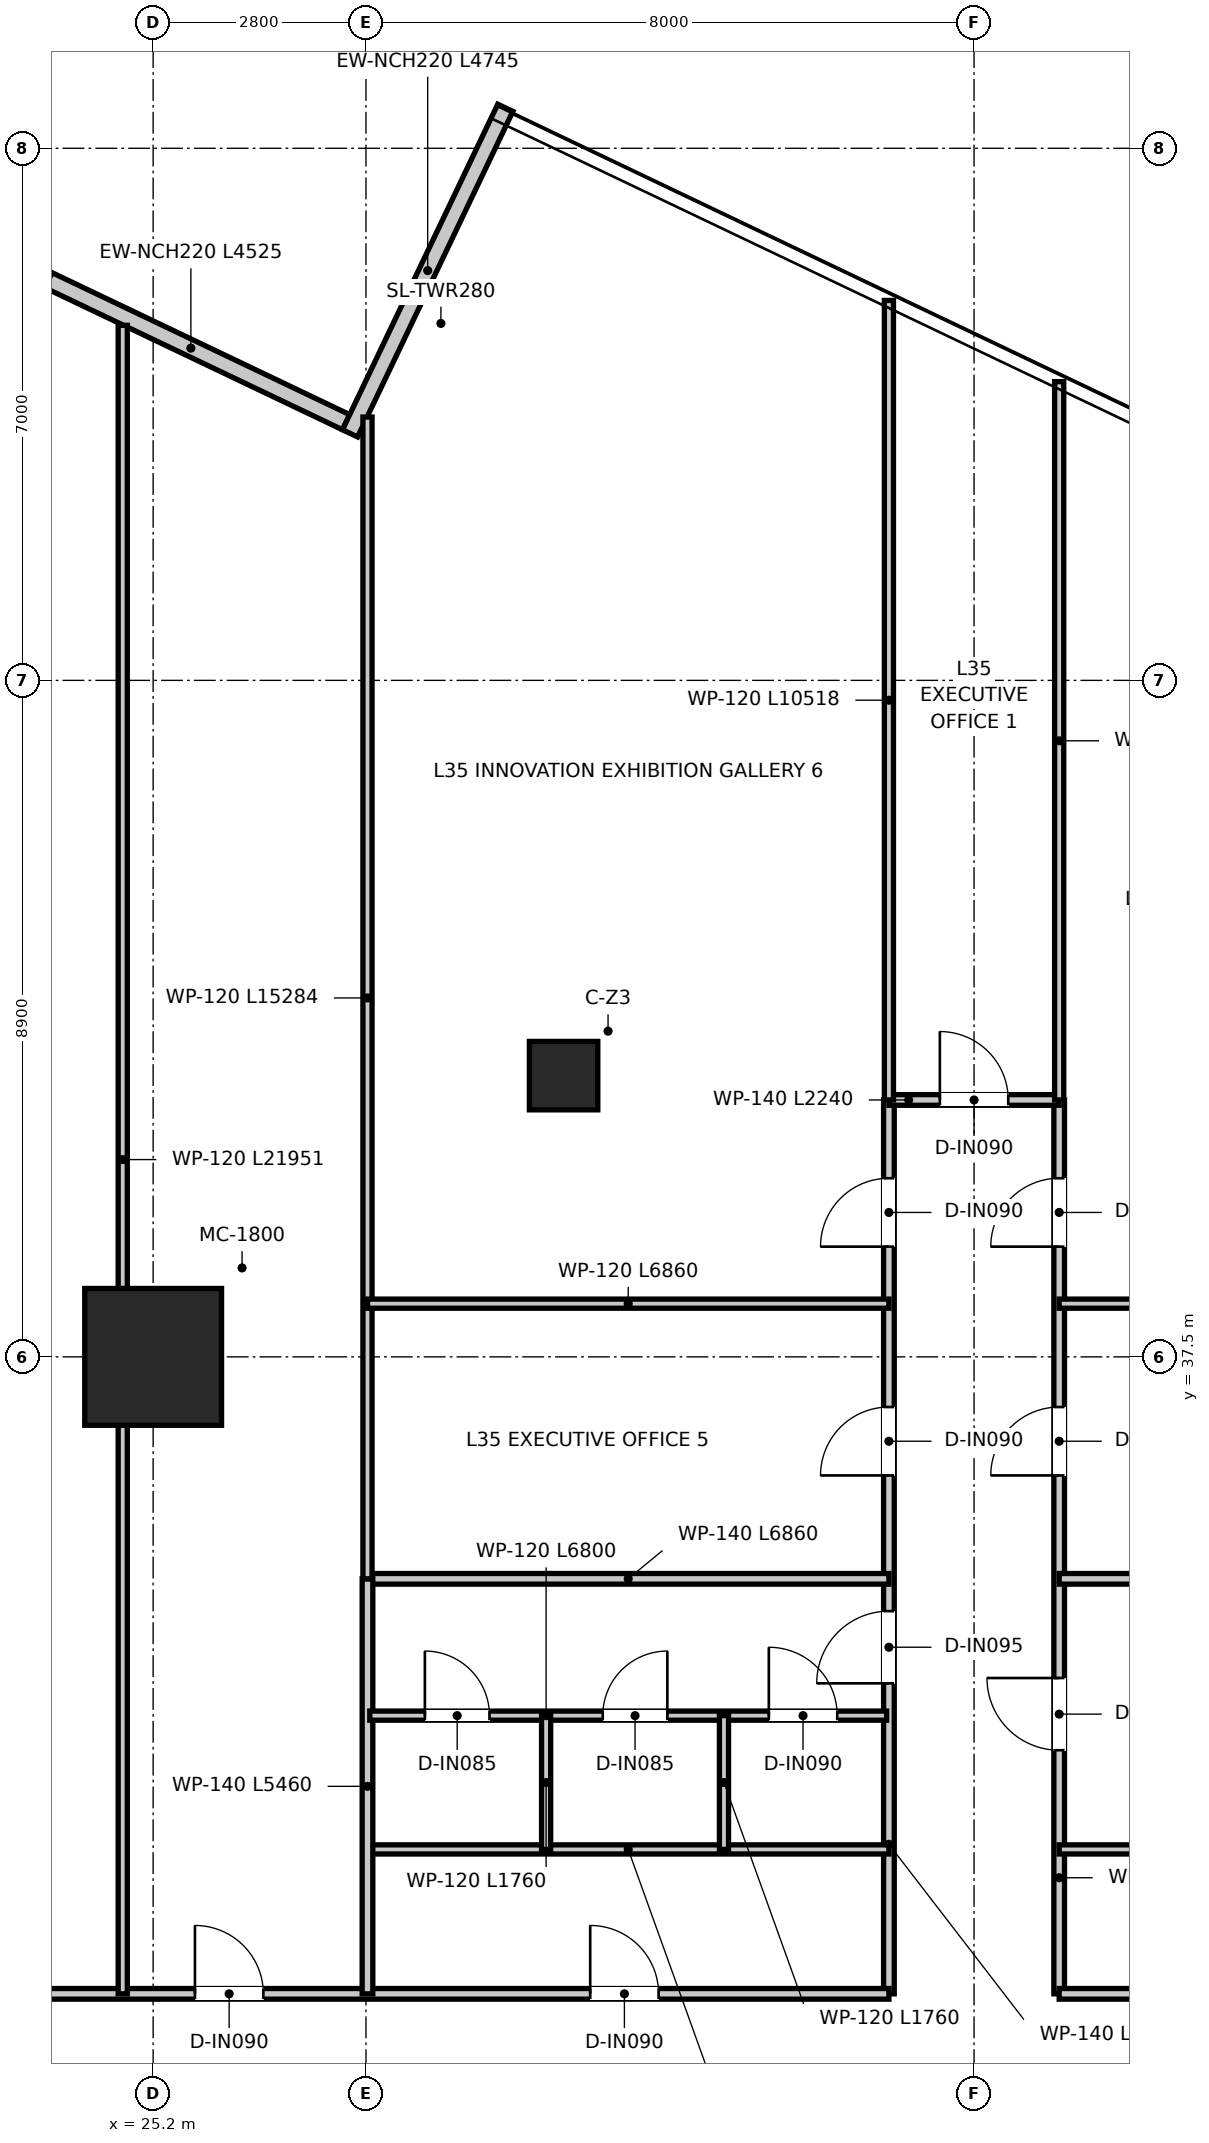
"""IFC4 building model, lengths in metres.
Left out: names, types, materials, properties, quantities, classifications, styles, units other than length and angle.
Written with IfcOpenShell. Run it as: python <this file> out.ifc"""

import sys

from ifc_helpers import new_model, si_unit, direction, frame, frame_2d, origin, origin_2d, place, context, subcontext, project, spatial, rectangle, extrude, source, transform, mapped, element, fill, save


model = new_model("IFC4")
c1 = context("Model", 3, precision=1e-05, world=origin(), true_north=direction((0.0, 1.0)))
c2 = subcontext(c1, "Body", "Model", "MODEL_VIEW")
j1 = project(units=[si_unit("LENGTHUNIT", "METRE"), si_unit("PLANEANGLEUNIT", "RADIAN")], contexts=[c1])
p1 = place(None, origin())
s1 = spatial("IfcSite", under=j1, at=p1, CompositionType="ELEMENT")
p2 = place(p1, origin())
s2 = spatial("IfcBuilding", under=s1, at=p2, CompositionType="ELEMENT")
p3 = place(p2, frame((0.0, 0.0, 146.2)))
s3 = spatial("IfcBuildingStorey", under=s2, at=p3, CompositionType="ELEMENT", Elevation=146.2)
m1 = source(origin(), c2, "Body", "SweptSolid", [
    extrude(rectangle(XDim=1.8, YDim=1.8, at=origin_2d()), origin(), (0.0, 0.0, 1.0), 3.95),
])
p4 = place(p3, frame((25.2, 37.5, 0.0), z_axis=(0.0, 0.0, 1.0), x_axis=(1.0, 0.0, 0.0)))
e1 = element("IfcColumn", 1, at=p4, inside=s3, PredefinedType="USERDEFINED", context=c2, shape_type="MappedRepresentation", body=[
    mapped(m1, transform((0.0, 0.0, 0.0), x_axis=(1.0, 0.0, 0.0), y_axis=(0.0, 1.0, 0.0), z_axis=(0.0, 0.0, 1.0), scale=1.0)),
])
m2 = source(origin(), c2, "Body", "SweptSolid", [
    extrude(rectangle(XDim=0.9, YDim=0.9, at=origin_2d()), origin(), (0.0, 0.0, 1.0), 3.95),
])
p5 = place(p3, frame((30.6, 41.2, 0.0), z_axis=(0.0, 0.0, 1.0), x_axis=(1.0, 0.0, 0.0)))
e2 = element("IfcColumn", 2, at=p5, inside=s3, PredefinedType="COLUMN", context=c2, shape_type="MappedRepresentation", body=[
    mapped(m2, transform((0.0, 0.0, 0.0), x_axis=(1.0, 0.0, 0.0), y_axis=(0.0, 1.0, 0.0), z_axis=(0.0, 0.0, 1.0), scale=1.0)),
])
p6 = place(p3, frame((27.739, 49.797, 0.0), z_axis=(0.0, 0.0, 1.0), x_axis=(-0.902592070314, 0.43049686945, 0.0)))
e3 = element("IfcWall", 3, at=p6, inside=s3, PredefinedType="ELEMENTEDWALL", context=c2, shape_type="SweptSolid", body=[
    extrude(rectangle(XDim=4.525, YDim=0.22, at=frame_2d((2.262, 0.0))), origin(), (0.0, 0.0, 1.0), 3.67),
])
p7 = place(p3, frame((29.833, 53.933, 0.0), z_axis=(0.0, 0.0, 1.0), x_axis=(-0.430506704164, -0.902587379521, 0.0)))
e4 = element("IfcWall", 4, at=p7, inside=s3, PredefinedType="ELEMENTEDWALL", context=c2, shape_type="SweptSolid", body=[
    extrude(rectangle(XDim=4.745, YDim=0.22, at=frame_2d((2.373, 0.0))), origin(), (0.0, 0.0, 1.0), 3.67),
])
p8 = place(p3, frame((34.88, 29.12, 0.0), z_axis=(0.0, 0.0, 1.0), x_axis=(0.0, 1.0, 0.0)))
e5 = element("IfcWall", 5, at=p8, inside=s3, PredefinedType="PARTITIONING", context=c2, shape_type="SweptSolid", body=[
    extrude(rectangle(XDim=11.76, YDim=0.14, at=frame_2d((5.88, 0.0))), origin(), (0.0, 0.0, 1.0), 3.03),
])
p9 = place(p8, frame((4.085, 0.0, 0.0)))
e6 = element("IfcOpeningElement", 6, at=p9, cuts=e5, PredefinedType="OPENING", context=c2, shape_type="SweptSolid", body=[
    extrude(rectangle(XDim=0.95, YDim=2.1, at=frame_2d((0.475, 1.05))), frame((0.0, 0.08, 0.0), z_axis=(0.0, -1.0, 0.0), x_axis=(1.0, 0.0, 0.0)), (0.0, 0.0, 1.0), 0.16),
])
p10 = place(p8, frame((6.82, 0.0, 0.0)))
e7 = element("IfcOpeningElement", 7, at=p10, cuts=e5, PredefinedType="OPENING", context=c2, shape_type="SweptSolid", body=[
    extrude(rectangle(XDim=0.9, YDim=2.1, at=frame_2d((0.45, 1.05))), frame((0.0, 0.08, 0.0), z_axis=(0.0, -1.0, 0.0), x_axis=(1.0, 0.0, 0.0)), (0.0, 0.0, 1.0), 0.16),
])
p11 = place(p8, frame((9.83, 0.0, 0.0)))
e8 = element("IfcOpeningElement", 8, at=p11, cuts=e5, PredefinedType="OPENING", context=c2, shape_type="SweptSolid", body=[
    extrude(rectangle(XDim=0.9, YDim=2.1, at=frame_2d((0.45, 1.05))), frame((0.0, 0.08, 0.0), z_axis=(0.0, -1.0, 0.0), x_axis=(1.0, 0.0, 0.0)), (0.0, 0.0, 1.0), 0.16),
])
p12 = place(p3, frame((37.12, 29.12, 0.0), z_axis=(0.0, 0.0, 1.0), x_axis=(0.0, 1.0, 0.0)))
e9 = element("IfcWall", 9, at=p12, inside=s3, PredefinedType="PARTITIONING", context=c2, shape_type="SweptSolid", body=[
    extrude(rectangle(XDim=11.76, YDim=0.14, at=frame_2d((5.88, 0.0))), origin(), (0.0, 0.0, 1.0), 3.03),
])
p13 = place(p12, frame((3.205, 0.0, 0.0)))
e10 = element("IfcOpeningElement", 10, at=p13, cuts=e9, PredefinedType="OPENING", context=c2, shape_type="SweptSolid", body=[
    extrude(rectangle(XDim=0.95, YDim=2.1, at=frame_2d((0.475, 1.05))), frame((0.0, 0.08, 0.0), z_axis=(0.0, -1.0, 0.0), x_axis=(1.0, 0.0, 0.0)), (0.0, 0.0, 1.0), 0.16),
])
p14 = place(p12, frame((6.82, 0.0, 0.0)))
e11 = element("IfcOpeningElement", 11, at=p14, cuts=e9, PredefinedType="OPENING", context=c2, shape_type="SweptSolid", body=[
    extrude(rectangle(XDim=0.9, YDim=2.1, at=frame_2d((0.45, 1.05))), frame((0.0, 0.08, 0.0), z_axis=(0.0, -1.0, 0.0), x_axis=(1.0, 0.0, 0.0)), (0.0, 0.0, 1.0), 0.16),
])
p15 = place(p12, frame((9.83, 0.0, 0.0)))
e12 = element("IfcOpeningElement", 12, at=p15, cuts=e9, PredefinedType="OPENING", context=c2, shape_type="SweptSolid", body=[
    extrude(rectangle(XDim=0.9, YDim=2.1, at=frame_2d((0.45, 1.05))), frame((0.0, 0.08, 0.0), z_axis=(0.0, -1.0, 0.0), x_axis=(1.0, 0.0, 0.0)), (0.0, 0.0, 1.0), 0.16),
])
p16 = place(p3, frame((34.88, 40.88, 0.0), z_axis=(0.0, 0.0, 1.0), x_axis=(1.0, 0.0, 0.0)))
e13 = element("IfcWall", 13, at=p16, inside=s3, PredefinedType="PARTITIONING", context=c2, shape_type="SweptSolid", body=[
    extrude(rectangle(XDim=2.24, YDim=0.14, at=frame_2d((1.12, 0.0))), origin(), (0.0, 0.0, 1.0), 3.67),
])
p17 = place(p16, frame((0.67, 0.0, 0.0)))
e14 = element("IfcOpeningElement", 14, at=p17, cuts=e13, PredefinedType="OPENING", context=c2, shape_type="SweptSolid", body=[
    extrude(rectangle(XDim=0.9, YDim=2.1, at=frame_2d((0.45, 1.05))), frame((0.0, 0.08, 0.0), z_axis=(0.0, -1.0, 0.0), x_axis=(1.0, 0.0, 0.0)), (0.0, 0.0, 1.0), 0.16),
])
p18 = place(p3, frame((12.99, 29.12, 0.0), z_axis=(0.0, 0.0, 1.0), x_axis=(1.0, 0.0, 0.0)))
e15 = element("IfcWall", 15, at=p18, inside=s3, PredefinedType="PARTITIONING", context=c2, shape_type="SweptSolid", body=[
    extrude(rectangle(XDim=21.889, YDim=0.14, at=frame_2d((10.945, 0.0))), origin(), (0.0, 0.0, 1.0), 3.03),
])
p19 = place(p18, frame((17.96, 0.0, 0.0)))
e16 = element("IfcOpeningElement", 16, at=p19, cuts=e15, PredefinedType="OPENING", context=c2, shape_type="SweptSolid", body=[
    extrude(rectangle(XDim=0.9, YDim=2.1, at=frame_2d((0.45, 1.05))), frame((0.0, 0.08, 0.0), z_axis=(0.0, -1.0, 0.0), x_axis=(1.0, 0.0, 0.0)), (0.0, 0.0, 1.0), 0.16),
])
p20 = place(p18, frame((1.978, 0.0, 0.0)))
e17 = element("IfcOpeningElement", 17, at=p20, cuts=e15, PredefinedType="OPENING", context=c2, shape_type="SweptSolid", body=[
    extrude(rectangle(XDim=0.9, YDim=2.1, at=frame_2d((0.45, 1.05))), frame((0.0, 0.08, 0.0), z_axis=(0.0, -1.0, 0.0), x_axis=(1.0, 0.0, 0.0)), (0.0, 0.0, 1.0), 0.16),
])
p21 = place(p18, frame((9.46, 0.0, 0.0)))
e18 = element("IfcOpeningElement", 18, at=p21, cuts=e15, PredefinedType="OPENING", context=c2, shape_type="SweptSolid", body=[
    extrude(rectangle(XDim=0.9, YDim=2.1, at=frame_2d((0.45, 1.05))), frame((0.0, 0.08, 0.0), z_axis=(0.0, -1.0, 0.0), x_axis=(1.0, 0.0, 0.0)), (0.0, 0.0, 1.0), 0.16),
])
p22 = place(p18, frame((12.76, 0.0, 0.0)))
e19 = element("IfcOpeningElement", 19, at=p22, cuts=e15, PredefinedType="OPENING", context=c2, shape_type="SweptSolid", body=[
    extrude(rectangle(XDim=0.9, YDim=2.1, at=frame_2d((0.45, 1.05))), frame((0.0, 0.08, 0.0), z_axis=(0.0, -1.0, 0.0), x_axis=(1.0, 0.0, 0.0)), (0.0, 0.0, 1.0), 0.16),
])
p23 = place(p3, frame((37.12, 29.12, 0.0), z_axis=(0.0, 0.0, 1.0), x_axis=(1.0, 0.0, 0.0)))
e20 = element("IfcWall", 20, at=p23, inside=s3, PredefinedType="PARTITIONING", context=c2, shape_type="SweptSolid", body=[
    extrude(rectangle(XDim=24.198, YDim=0.14, at=frame_2d((12.099, 0.0))), origin(), (0.0, 0.0, 1.0), 3.03),
])
p24 = place(p23, frame((3.03, 0.0, 0.0)))
e21 = element("IfcOpeningElement", 21, at=p24, cuts=e20, PredefinedType="OPENING", context=c2, shape_type="SweptSolid", body=[
    extrude(rectangle(XDim=0.9, YDim=2.1, at=frame_2d((0.45, 1.05))), frame((0.0, 0.08, 0.0), z_axis=(0.0, -1.0, 0.0), x_axis=(1.0, 0.0, 0.0)), (0.0, 0.0, 1.0), 0.16),
])
p25 = place(p23, frame((8.67, 0.0, 0.0)))
e22 = element("IfcOpeningElement", 22, at=p25, cuts=e20, PredefinedType="OPENING", context=c2, shape_type="SweptSolid", body=[
    extrude(rectangle(XDim=0.9, YDim=2.1, at=frame_2d((0.45, 1.05))), frame((0.0, 0.08, 0.0), z_axis=(0.0, -1.0, 0.0), x_axis=(1.0, 0.0, 0.0)), (0.0, 0.0, 1.0), 0.16),
])
p26 = place(p23, frame((17.762, 0.0, 0.0)))
e23 = element("IfcOpeningElement", 23, at=p26, cuts=e20, PredefinedType="OPENING", context=c2, shape_type="SweptSolid", body=[
    extrude(rectangle(XDim=0.9, YDim=2.1, at=frame_2d((0.45, 1.05))), frame((0.0, 0.08, 0.0), z_axis=(0.0, -1.0, 0.0), x_axis=(1.0, 0.0, 0.0)), (0.0, 0.0, 1.0), 0.16),
])
for number, where, z_axis, x_axis in (
    (24, (28.02, 31.02, 0.0), (0.0, 0.0, 1.0), (1.0, 0.0, 0.0)),
    (25, (37.12, 31.02, 0.0), (0.0, 0.0, 1.0), (1.0, 0.0, 0.0)),
):
    element("IfcWall", number, at=place(p3, frame(where, z_axis=z_axis, x_axis=x_axis)), inside=s3, PredefinedType="PARTITIONING", context=c2, shape_type="SweptSolid", body=[
        extrude(rectangle(XDim=6.86, YDim=0.12, at=frame_2d((3.43, 0.0))), origin(), (0.0, 0.0, 1.0), 3.08),
    ])
for number, where, z_axis, x_axis in (
    (26, (28.02, 34.58, 0.0), (0.0, 0.0, 1.0), (1.0, 0.0, 0.0)),
    (27, (37.12, 34.58, 0.0), (0.0, 0.0, 1.0), (1.0, 0.0, 0.0)),
):
    element("IfcWall", number, at=place(p3, frame(where, z_axis=z_axis, x_axis=x_axis)), inside=s3, PredefinedType="PARTITIONING", context=c2, shape_type="SweptSolid", body=[
        extrude(rectangle(XDim=6.86, YDim=0.14, at=frame_2d((3.43, 0.0))), origin(), (0.0, 0.0, 1.0), 3.08),
    ])
p27 = place(p3, frame((28.02, 29.12, 0.0), z_axis=(0.0, 0.0, 1.0), x_axis=(0.0, 1.0, 0.0)))
e28 = element("IfcWall", 28, at=p27, inside=s3, PredefinedType="PARTITIONING", context=c2, shape_type="SweptSolid", body=[
    extrude(rectangle(XDim=5.46, YDim=0.14, at=frame_2d((2.73, 0.0))), origin(), (0.0, 0.0, 1.0), 3.31),
])
p28 = place(p3, frame((28.05, 32.78, 0.0), z_axis=(0.0, 0.0, 1.0), x_axis=(1.0, 0.0, 0.0)))
e29 = element("IfcWall", 29, at=p28, inside=s3, PredefinedType="PARTITIONING", context=c2, shape_type="SweptSolid", body=[
    extrude(rectangle(XDim=6.8, YDim=0.12, at=frame_2d((3.4, 0.0))), origin(), (0.0, 0.0, 1.0), 3.08),
])
p29 = place(p28, frame((0.725, 0.0, 0.0)))
e30 = element("IfcOpeningElement", 30, at=p29, cuts=e29, PredefinedType="OPENING", context=c2, shape_type="SweptSolid", body=[
    extrude(rectangle(XDim=0.85, YDim=2.1, at=frame_2d((0.425, 1.05))), frame((0.0, 0.07, 0.0), z_axis=(0.0, -1.0, 0.0), x_axis=(1.0, 0.0, 0.0)), (0.0, 0.0, 1.0), 0.14),
])
p30 = place(p28, frame((3.065, 0.0, 0.0)))
e31 = element("IfcOpeningElement", 31, at=p30, cuts=e29, PredefinedType="OPENING", context=c2, shape_type="SweptSolid", body=[
    extrude(rectangle(XDim=0.85, YDim=2.1, at=frame_2d((0.425, 1.05))), frame((0.0, 0.07, 0.0), z_axis=(0.0, -1.0, 0.0), x_axis=(1.0, 0.0, 0.0)), (0.0, 0.0, 1.0), 0.14),
])
p31 = place(p28, frame((5.25, 0.0, 0.0)))
e32 = element("IfcOpeningElement", 32, at=p31, cuts=e29, PredefinedType="OPENING", context=c2, shape_type="SweptSolid", body=[
    extrude(rectangle(XDim=0.9, YDim=2.1, at=frame_2d((0.45, 1.05))), frame((0.0, 0.07, 0.0), z_axis=(0.0, -1.0, 0.0), x_axis=(1.0, 0.0, 0.0)), (0.0, 0.0, 1.0), 0.14),
])
p32 = place(p3, frame((30.37, 31.02, 0.0), z_axis=(0.0, 0.0, 1.0), x_axis=(0.0, 1.0, 0.0)))
e33 = element("IfcWall", 33, at=p32, inside=s3, PredefinedType="PARTITIONING", context=c2, shape_type="SweptSolid", body=[
    extrude(rectangle(XDim=1.76, YDim=0.12, at=frame_2d((0.88, 0.0))), origin(), (0.0, 0.0, 1.0), 3.08),
])
p33 = place(p3, frame((32.71, 31.02, 0.0), z_axis=(0.0, 0.0, 1.0), x_axis=(0.0, 1.0, 0.0)))
e34 = element("IfcWall", 34, at=p33, inside=s3, PredefinedType="PARTITIONING", context=c2, shape_type="SweptSolid", body=[
    extrude(rectangle(XDim=1.76, YDim=0.12, at=frame_2d((0.88, 0.0))), origin(), (0.0, 0.0, 1.0), 3.67),
])
p34 = place(p3, frame((34.88, 40.88, 0.0), z_axis=(0.0, 0.0, 1.0), x_axis=(0.0, 1.0, 0.0)))
e35 = element("IfcWall", 35, at=p34, inside=s3, PredefinedType="PARTITIONING", context=c2, shape_type="SweptSolid", body=[
    extrude(rectangle(XDim=10.518, YDim=0.12, at=frame_2d((5.259, 0.0))), origin(), (0.0, 0.0, 1.0), 3.28),
])
p35 = place(p3, frame((37.12, 40.88, 0.0), z_axis=(0.0, 0.0, 1.0), x_axis=(0.0, 1.0, 0.0)))
e36 = element("IfcWall", 36, at=p35, inside=s3, PredefinedType="PARTITIONING", context=c2, shape_type="SweptSolid", body=[
    extrude(rectangle(XDim=9.45, YDim=0.12, at=frame_2d((4.725, 0.0))), origin(), (0.0, 0.0, 1.0), 3.28),
])
p36 = place(p3, frame((24.8, 29.12, 0.0), z_axis=(0.0, 0.0, 1.0), x_axis=(0.0, 1.0, 0.0)))
e37 = element("IfcWall", 37, at=p36, inside=s3, PredefinedType="PARTITIONING", context=c2, shape_type="SweptSolid", body=[
    extrude(rectangle(XDim=21.951, YDim=0.12, at=frame_2d((10.975, 0.0))), origin(), (0.0, 0.0, 1.0), 3.08),
])
p37 = place(p3, frame((28.02, 34.58, 0.0), z_axis=(0.0, 0.0, 1.0), x_axis=(0.0, 1.0, 0.0)))
e38 = element("IfcWall", 38, at=p37, inside=s3, PredefinedType="PARTITIONING", context=c2, shape_type="SweptSolid", body=[
    extrude(rectangle(XDim=15.284, YDim=0.12, at=frame_2d((7.642, 0.0))), origin(), (0.0, 0.0, 1.0), 3.03),
])
for number, where, z_axis, x_axis in (
    (39, (28.02, 38.2, 0.0), (0.0, 0.0, 1.0), (1.0, 0.0, 0.0)),
    (40, (37.12, 38.2, 0.0), (0.0, 0.0, 1.0), (1.0, 0.0, 0.0)),
):
    element("IfcWall", number, at=place(p3, frame(where, z_axis=z_axis, x_axis=x_axis)), inside=s3, PredefinedType="PARTITIONING", context=c2, shape_type="SweptSolid", body=[
        extrude(rectangle(XDim=6.86, YDim=0.12, at=frame_2d((3.43, 0.0))), origin(), (0.0, 0.0, 1.0), 3.08),
    ])
p38 = place(p19, origin())
e41 = element("IfcDoor", 41, at=p38, inside=s3, OperationType="SINGLE_SWING_LEFT", PredefinedType="DOOR", context=c2, shape_type="SweptSolid", body=[
    extrude(rectangle(XDim=0.9, YDim=2.1, at=frame_2d((0.45, 1.05))), frame((0.0, 0.025, 0.0), z_axis=(0.0, -1.0, 0.0), x_axis=(1.0, 0.0, 0.0)), (0.0, 0.0, 1.0), 0.05),
])
fill(e16, e41)
p39 = place(p9, origin())
e42 = element("IfcDoor", 42, at=p39, inside=s3, OperationType="SINGLE_SWING_LEFT", PredefinedType="DOOR", context=c2, shape_type="SweptSolid", body=[
    extrude(rectangle(XDim=0.95, YDim=2.1, at=frame_2d((0.475, 1.05))), frame((0.0, 0.025, 0.0), z_axis=(0.0, -1.0, 0.0), x_axis=(1.0, 0.0, 0.0)), (0.0, 0.0, 1.0), 0.05),
])
fill(e6, e42)
p40 = place(p13, origin())
e43 = element("IfcDoor", 43, at=p40, inside=s3, OperationType="SINGLE_SWING_RIGHT", PredefinedType="DOOR", context=c2, shape_type="SweptSolid", body=[
    extrude(rectangle(XDim=0.95, YDim=2.1, at=frame_2d((0.475, 1.05))), frame((0.0, 0.025, 0.0), z_axis=(0.0, -1.0, 0.0), x_axis=(1.0, 0.0, 0.0)), (0.0, 0.0, 1.0), 0.05),
])
fill(e10, e43)
p41 = place(p29, origin())
e44 = element("IfcDoor", 44, at=p41, inside=s3, OperationType="SINGLE_SWING_LEFT", PredefinedType="DOOR", context=c2, shape_type="SweptSolid", body=[
    extrude(rectangle(XDim=0.85, YDim=2.1, at=frame_2d((0.425, 1.05))), frame((0.0, 0.025, 0.0), z_axis=(0.0, -1.0, 0.0), x_axis=(1.0, 0.0, 0.0)), (0.0, 0.0, 1.0), 0.05),
])
fill(e30, e44)
p42 = place(p30, origin())
e45 = element("IfcDoor", 45, at=p42, inside=s3, OperationType="SINGLE_SWING_RIGHT", PredefinedType="DOOR", context=c2, shape_type="SweptSolid", body=[
    extrude(rectangle(XDim=0.85, YDim=2.1, at=frame_2d((0.425, 1.05))), frame((0.0, 0.025, 0.0), z_axis=(0.0, -1.0, 0.0), x_axis=(1.0, 0.0, 0.0)), (0.0, 0.0, 1.0), 0.05),
])
fill(e31, e45)
p43 = place(p31, origin())
e46 = element("IfcDoor", 46, at=p43, inside=s3, OperationType="SINGLE_SWING_LEFT", PredefinedType="DOOR", context=c2, shape_type="SweptSolid", body=[
    extrude(rectangle(XDim=0.9, YDim=2.1, at=frame_2d((0.45, 1.05))), frame((0.0, 0.025, 0.0), z_axis=(0.0, -1.0, 0.0), x_axis=(1.0, 0.0, 0.0)), (0.0, 0.0, 1.0), 0.05),
])
fill(e32, e46)
p44 = place(p17, origin())
e47 = element("IfcDoor", 47, at=p44, inside=s3, OperationType="SINGLE_SWING_LEFT", PredefinedType="DOOR", context=c2, shape_type="SweptSolid", body=[
    extrude(rectangle(XDim=0.9, YDim=2.1, at=frame_2d((0.45, 1.05))), frame((0.0, 0.025, 0.0), z_axis=(0.0, -1.0, 0.0), x_axis=(1.0, 0.0, 0.0)), (0.0, 0.0, 1.0), 0.05),
])
fill(e14, e47)
p45 = place(p22, origin())
e48 = element("IfcDoor", 48, at=p45, inside=s3, OperationType="SINGLE_SWING_LEFT", PredefinedType="DOOR", context=c2, shape_type="SweptSolid", body=[
    extrude(rectangle(XDim=0.9, YDim=2.1, at=frame_2d((0.45, 1.05))), frame((0.0, 0.025, 0.0), z_axis=(0.0, -1.0, 0.0), x_axis=(1.0, 0.0, 0.0)), (0.0, 0.0, 1.0), 0.05),
])
fill(e19, e48)
p46 = place(p10, origin())
e49 = element("IfcDoor", 49, at=p46, inside=s3, OperationType="SINGLE_SWING_LEFT", PredefinedType="DOOR", context=c2, shape_type="SweptSolid", body=[
    extrude(rectangle(XDim=0.9, YDim=2.1, at=frame_2d((0.45, 1.05))), frame((0.0, 0.025, 0.0), z_axis=(0.0, -1.0, 0.0), x_axis=(1.0, 0.0, 0.0)), (0.0, 0.0, 1.0), 0.05),
])
fill(e7, e49)
p47 = place(p11, origin())
e50 = element("IfcDoor", 50, at=p47, inside=s3, OperationType="SINGLE_SWING_LEFT", PredefinedType="DOOR", context=c2, shape_type="SweptSolid", body=[
    extrude(rectangle(XDim=0.9, YDim=2.1, at=frame_2d((0.45, 1.05))), frame((0.0, 0.025, 0.0), z_axis=(0.0, -1.0, 0.0), x_axis=(1.0, 0.0, 0.0)), (0.0, 0.0, 1.0), 0.05),
])
fill(e8, e50)
p48 = place(p14, origin())
e51 = element("IfcDoor", 51, at=p48, inside=s3, OperationType="SINGLE_SWING_LEFT", PredefinedType="DOOR", context=c2, shape_type="SweptSolid", body=[
    extrude(rectangle(XDim=0.9, YDim=2.1, at=frame_2d((0.45, 1.05))), frame((0.0, 0.025, 0.0), z_axis=(0.0, -1.0, 0.0), x_axis=(1.0, 0.0, 0.0)), (0.0, 0.0, 1.0), 0.05),
])
fill(e11, e51)
p49 = place(p15, origin())
e52 = element("IfcDoor", 52, at=p49, inside=s3, OperationType="SINGLE_SWING_LEFT", PredefinedType="DOOR", context=c2, shape_type="SweptSolid", body=[
    extrude(rectangle(XDim=0.9, YDim=2.1, at=frame_2d((0.45, 1.05))), frame((0.0, 0.025, 0.0), z_axis=(0.0, -1.0, 0.0), x_axis=(1.0, 0.0, 0.0)), (0.0, 0.0, 1.0), 0.05),
])
fill(e12, e52)
save(model, sys.argv[1])
